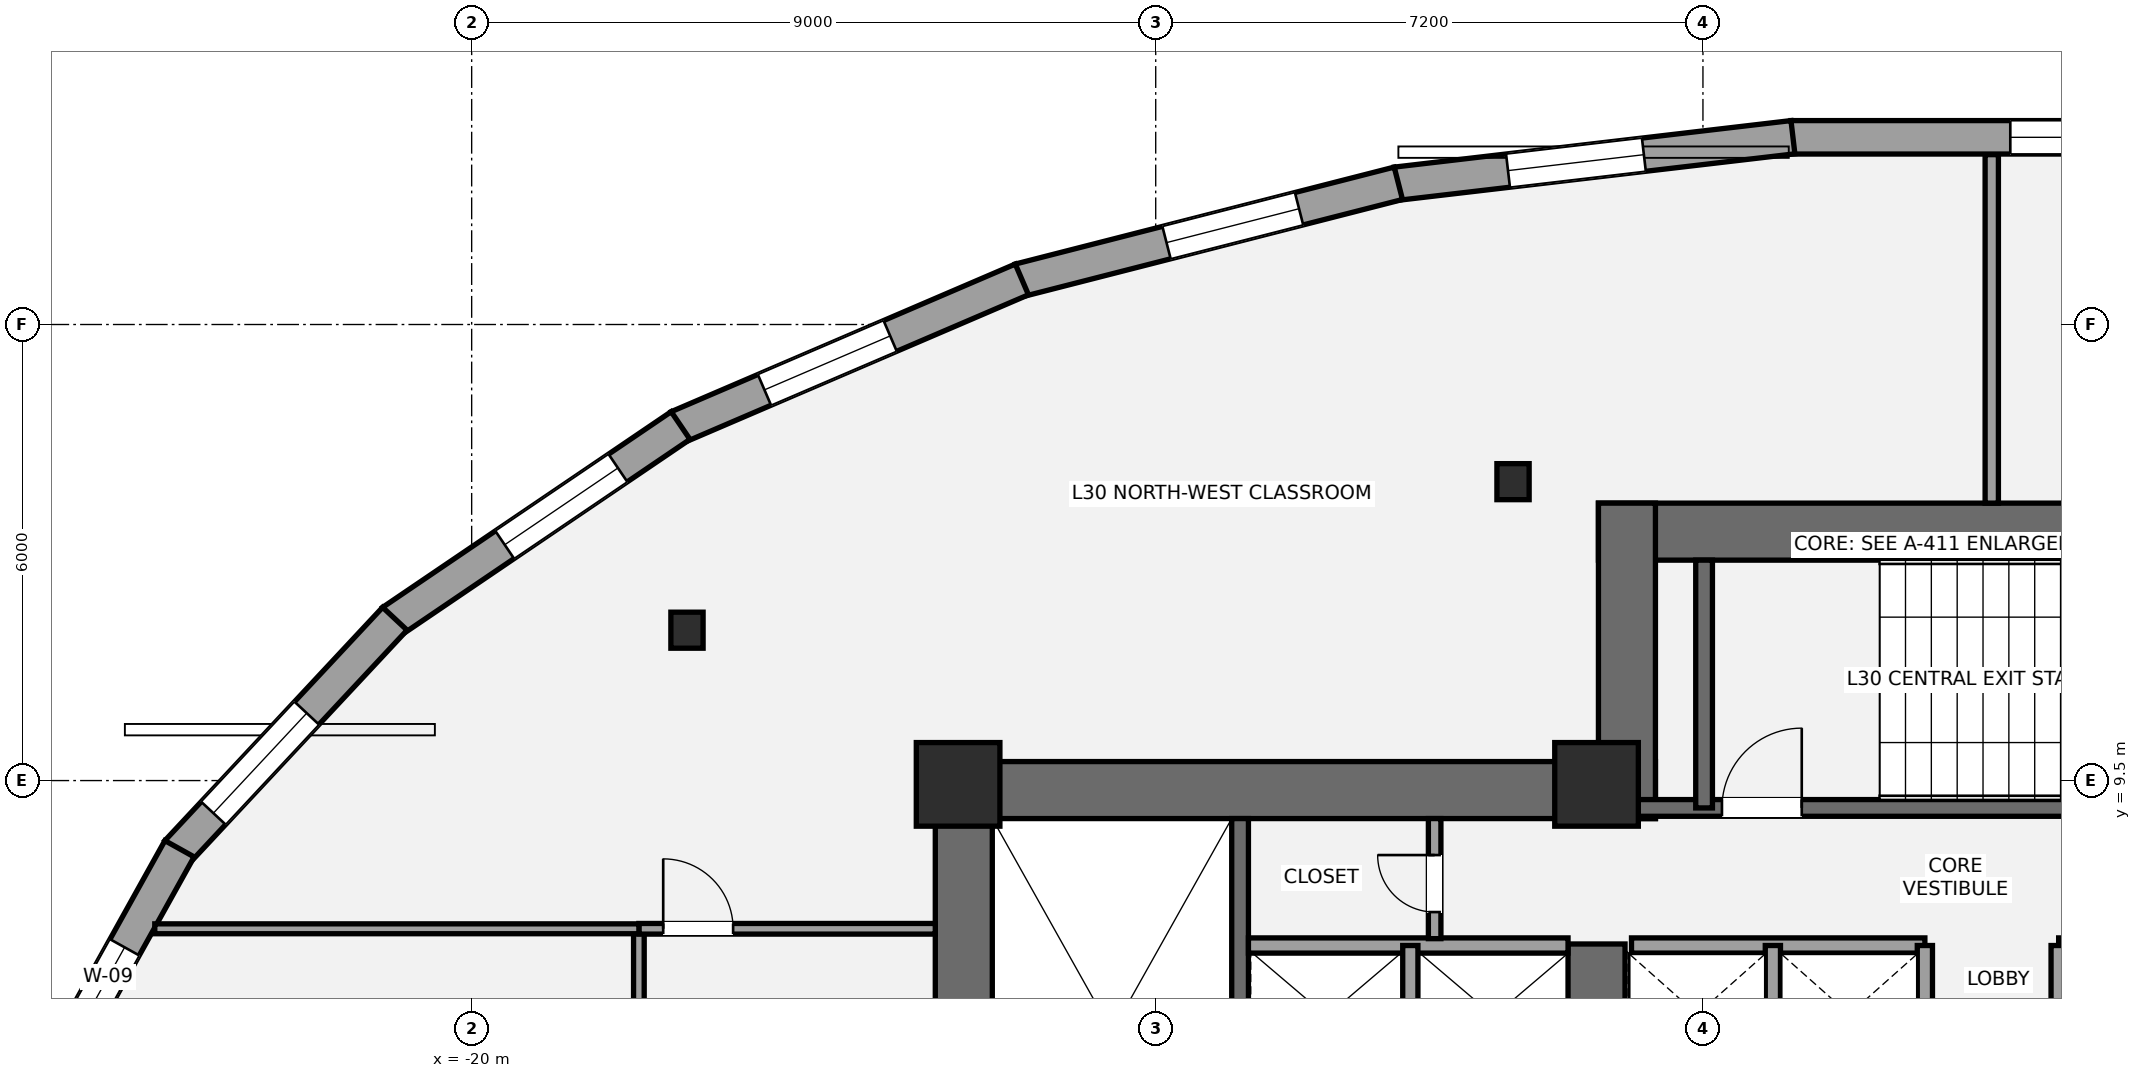
"""IFC4 building model, lengths in metres.
Left out: names, types, materials, properties, quantities, classifications, styles, units other than length and angle.
Written with IfcOpenShell. Run it as: python <this file> out.ifc"""

import sys

from ifc_helpers import new_model, si_unit, direction, frame, frame_2d, origin, origin_2d, place, context, subcontext, project, spatial, rectangle, i_section, extrude, element, fill, save


model = new_model("IFC4")
c1 = context("Model", 3, precision=1e-05, world=origin(), true_north=direction((0.0, 1.0)))
c2 = subcontext(c1, "Body", "Model", "MODEL_VIEW")
j1 = project(units=[si_unit("LENGTHUNIT", "METRE"), si_unit("PLANEANGLEUNIT", "RADIAN")], contexts=[c1])
p1 = place(None, origin())
s1 = spatial("IfcSite", under=j1, at=p1, CompositionType="ELEMENT")
p2 = place(p1, origin())
s2 = spatial("IfcBuilding", under=s1, at=p2, CompositionType="ELEMENT")
p3 = place(p2, frame((0.0, 0.0, 114.1)))
s3 = spatial("IfcBuildingStorey", under=s2, at=p3, CompositionType="ELEMENT", Elevation=114.1)
p4 = place(p3, frame((-13.525, 1.1, 0.0), z_axis=(0.0, 0.0, 1.0), x_axis=(0.0, 1.0, 0.0)))
e1 = element("IfcWall", 1, at=p4, inside=s3, PredefinedType="SHEAR", context=c2, shape_type="SweptSolid", body=[
    extrude(rectangle(XDim=8.65, YDim=0.75, at=frame_2d((4.325, 0.0))), origin(), (0.0, 0.0, 1.0), 3.5),
])
p5 = place(p3, frame((-13.9, 9.375, 0.0), z_axis=(0.0, 0.0, 1.0), x_axis=(1.0, 0.0, 0.0)))
e2 = element("IfcWall", 2, at=p5, inside=s3, PredefinedType="SHEAR", context=c2, shape_type="SweptSolid", body=[
    extrude(rectangle(XDim=9.475, YDim=0.75, at=frame_2d((4.737, 0.0))), origin(), (0.0, 0.0, 1.0), 3.5),
])
p6 = place(p3, frame((-5.2, 5.35, 0.0), z_axis=(0.0, 0.0, 1.0), x_axis=(0.0, 1.0, 0.0)))
e3 = element("IfcWall", 3, at=p6, inside=s3, PredefinedType="SHEAR", context=c2, shape_type="SweptSolid", body=[
    extrude(rectangle(XDim=2.0, YDim=0.75, at=frame_2d((1.0, 0.0))), origin(), (0.0, 0.0, 1.0), 3.5),
])
p7 = place(p3, frame((-9.89, 1.85, 0.0), z_axis=(0.0, 0.0, 1.0), x_axis=(0.0, 1.0, 0.0)))
e4 = element("IfcWall", 4, at=p7, inside=s3, PredefinedType="SHEAR", context=c2, shape_type="SweptSolid", body=[
    extrude(rectangle(XDim=7.15, YDim=0.22, at=frame_2d((3.575, 0.0))), origin(), (0.0, 0.0, 1.0), 3.5),
])
p8 = place(p3, frame((-5.175, 12.775, 0.0), z_axis=(0.0, 0.0, 1.0), x_axis=(1.0, 0.0, 0.0)))
e5 = element("IfcWall", 5, at=p8, inside=s3, PredefinedType="SHEAR", context=c2, shape_type="SweptSolid", body=[
    extrude(rectangle(XDim=10.35, YDim=0.75, at=frame_2d((5.175, 0.0))), origin(), (0.0, 0.0, 1.0), 3.5),
])
p9 = place(p3, frame((-4.8, 9.0, 0.0), z_axis=(0.0, 0.0, 1.0), x_axis=(0.0, 1.0, 0.0)))
e6 = element("IfcWall", 6, at=p9, inside=s3, PredefinedType="SHEAR", context=c2, shape_type="SweptSolid", body=[
    extrude(rectangle(XDim=4.15, YDim=0.75, at=frame_2d((2.075, 0.0))), origin(), (0.0, 0.0, 1.0), 3.5),
])
p10 = place(p3, frame((-4.7, 9.14, 0.0), z_axis=(0.0, 0.0, 1.0), x_axis=(1.0, 0.0, 0.0)))
e7 = element("IfcWall", 7, at=p10, inside=s3, PredefinedType="SHEAR", context=c2, shape_type="SweptSolid", body=[
    extrude(rectangle(XDim=9.3, YDim=0.22, at=frame_2d((4.65, 0.0))), origin(), (0.0, 0.0, 1.0), 3.5),
])
p11 = place(p10, frame((1.15, 0.0, 0.0)))
e8 = element("IfcOpeningElement", 8, at=p11, cuts=e7, PredefinedType="OPENING", context=c2, shape_type="SweptSolid", body=[
    extrude(rectangle(XDim=1.05, YDim=2.15, at=frame_2d((0.525, 1.075))), frame((0.0, 0.12, 0.0), z_axis=(0.0, -1.0, 0.0), x_axis=(1.0, 0.0, 0.0)), (0.0, 0.0, 1.0), 0.24),
])
p12 = place(p3, frame((-3.785, 9.14, 0.0), z_axis=(0.0, 0.0, 1.0), x_axis=(0.0, 1.0, 0.0)))
e9 = element("IfcWall", 9, at=p12, inside=s3, PredefinedType="SHEAR", context=c2, shape_type="SweptSolid", body=[
    extrude(rectangle(XDim=3.26, YDim=0.22, at=frame_2d((1.63, 0.0))), origin(), (0.0, 0.0, 1.0), 3.5),
])
for number, where, z_axis, x_axis in (
    (10, (-13.6, 9.45, 0.0), (0.0, 0.0, 1.0), (1.0, 0.0, 0.0)),
    (11, (-5.2, 9.45, 0.0), (0.0, 0.0, 1.0), (1.0, 0.0, 0.0)),
):
    element("IfcColumn", number, at=place(p3, frame(where, z_axis=z_axis, x_axis=x_axis)), inside=s3, PredefinedType="COLUMN", context=c2, shape_type="SweptSolid", body=[
        extrude(rectangle(XDim=1.1, YDim=1.1, at=origin_2d()), origin(), (0.0, 0.0, 1.0), 3.5),
    ])
for number, where, z_axis, x_axis in (
    (12, (-6.299, 13.433, 0.0), (0.0, 0.0, 1.0), (1.0, 0.0, 0.0)),
    (13, (-17.167, 11.478, 0.0), (0.0, 0.0, 1.0), (1.0, 0.0, 0.0)),
):
    element("IfcColumn", number, at=place(p3, frame(where, z_axis=z_axis, x_axis=x_axis)), inside=s3, PredefinedType="COLUMN", context=c2, shape_type="SweptSolid", body=[
        extrude(i_section(OverallWidth=0.424, OverallDepth=0.474, WebThickness=0.048, FlangeThickness=0.077, at=origin_2d()), origin(), (0.0, 0.0, 1.0), 3.5),
    ])
p13 = place(p3, frame((-2.642, 17.963, 0.0), z_axis=(0.0, 0.0, 1.0), x_axis=(1.0, 0.0, 0.0)))
e14 = element("IfcWall", 14, at=p13, inside=s3, PredefinedType="STANDARD", context=c2, shape_type="SweptSolid", body=[
    extrude(rectangle(XDim=5.283, YDim=0.44, at=frame_2d((2.642, 0.0))), origin(), (0.0, 0.0, 1.0), 2.528),
])
p14 = place(p13, frame((2.885, 0.0, 0.65)))
e15 = element("IfcOpeningElement", 15, at=p14, cuts=e14, PredefinedType="OPENING", context=c2, shape_type="SweptSolid", body=[
    extrude(rectangle(XDim=1.8, YDim=1.7, at=frame_2d((0.9, 0.85))), frame((0.0, 0.23, 0.0), z_axis=(0.0, -1.0, 0.0), x_axis=(1.0, 0.0, 0.0)), (0.0, 0.0, 1.0), 0.46),
])
p15 = place(p3, frame((-7.836, 17.352, 0.0), z_axis=(0.0, 0.0, 1.0), x_axis=(0.993202502633, 0.116399264444, 0.0)))
e16 = element("IfcWall", 16, at=p15, inside=s3, PredefinedType="STANDARD", context=c2, shape_type="SweptSolid", body=[
    extrude(rectangle(XDim=5.256, YDim=0.44, at=frame_2d((2.628, 0.0))), origin(), (0.0, 0.0, 1.0), 2.528),
])
p16 = place(p15, frame((1.482, 0.0, 0.65)))
e17 = element("IfcOpeningElement", 17, at=p16, cuts=e16, PredefinedType="OPENING", context=c2, shape_type="SweptSolid", body=[
    extrude(rectangle(XDim=1.8, YDim=1.7, at=frame_2d((0.9, 0.85))), frame((0.0, 0.23, 0.0), z_axis=(0.0, -1.0, 0.0), x_axis=(1.0, 0.0, 0.0)), (0.0, 0.0, 1.0), 0.46),
])
p17 = place(p3, frame((-12.793, 16.082, 0.0), z_axis=(0.0, 0.0, 1.0), x_axis=(0.968802439575, 0.247834285507, 0.0)))
e18 = element("IfcWall", 18, at=p17, inside=s3, PredefinedType="STANDARD", context=c2, shape_type="SweptSolid", body=[
    extrude(rectangle(XDim=5.146, YDim=0.44, at=frame_2d((2.573, 0.0))), origin(), (0.0, 0.0, 1.0), 2.528),
])
p18 = place(p17, frame((1.998, 0.0, 0.65)))
e19 = element("IfcOpeningElement", 19, at=p18, cuts=e18, PredefinedType="OPENING", context=c2, shape_type="SweptSolid", body=[
    extrude(rectangle(XDim=1.8, YDim=1.7, at=frame_2d((0.9, 0.85))), frame((0.0, 0.23, 0.0), z_axis=(0.0, -1.0, 0.0), x_axis=(1.0, 0.0, 0.0)), (0.0, 0.0, 1.0), 0.46),
])
p19 = place(p3, frame((-17.288, 14.151, 0.0), z_axis=(0.0, 0.0, 1.0), x_axis=(0.919001414266, 0.39425423343, 0.0)))
e20 = element("IfcWall", 20, at=p19, inside=s3, PredefinedType="STANDARD", context=c2, shape_type="SweptSolid", body=[
    extrude(rectangle(XDim=4.926, YDim=0.44, at=frame_2d((2.463, 0.0))), origin(), (0.0, 0.0, 1.0), 2.528),
])
p20 = place(p19, frame((1.241, 0.0, 0.65)))
e21 = element("IfcOpeningElement", 21, at=p20, cuts=e20, PredefinedType="OPENING", context=c2, shape_type="SweptSolid", body=[
    extrude(rectangle(XDim=1.8, YDim=1.7, at=frame_2d((0.9, 0.85))), frame((0.0, 0.23, 0.0), z_axis=(0.0, -1.0, 0.0), x_axis=(1.0, 0.0, 0.0)), (0.0, 0.0, 1.0), 0.46),
])
p21 = place(p3, frame((-21.048, 11.597, 0.0), z_axis=(0.0, 0.0, 1.0), x_axis=(0.827717717125, 0.561144705719, 0.0)))
e22 = element("IfcWall", 22, at=p21, inside=s3, PredefinedType="STANDARD", context=c2, shape_type="SweptSolid", body=[
    extrude(rectangle(XDim=4.587, YDim=0.44, at=frame_2d((2.293, 0.0))), origin(), (0.0, 0.0, 1.0), 2.528),
])
p22 = place(p21, frame((1.791, 0.0, 0.65)))
e23 = element("IfcOpeningElement", 23, at=p22, cuts=e22, PredefinedType="OPENING", context=c2, shape_type="SweptSolid", body=[
    extrude(rectangle(XDim=1.8, YDim=1.7, at=frame_2d((0.9, 0.85))), frame((0.0, 0.23, 0.0), z_axis=(0.0, -1.0, 0.0), x_axis=(1.0, 0.0, 0.0)), (0.0, 0.0, 1.0), 0.46),
])
p23 = place(p3, frame((-23.875, 8.56, 0.0), z_axis=(0.0, 0.0, 1.0), x_axis=(0.682353469166, 0.73102239577, 0.0)))
e24 = element("IfcWall", 24, at=p23, inside=s3, PredefinedType="STANDARD", context=c2, shape_type="SweptSolid", body=[
    extrude(rectangle(XDim=4.199, YDim=0.44, at=frame_2d((2.099, 0.0))), origin(), (0.0, 0.0, 1.0), 2.528),
])
p24 = place(p23, frame((0.7, 0.0, 0.65)))
e25 = element("IfcOpeningElement", 25, at=p24, cuts=e24, PredefinedType="OPENING", context=c2, shape_type="SweptSolid", body=[
    extrude(rectangle(XDim=1.8, YDim=1.7, at=frame_2d((0.9, 0.85))), frame((0.0, 0.23, 0.0), z_axis=(0.0, -1.0, 0.0), x_axis=(1.0, 0.0, 0.0)), (0.0, 0.0, 1.0), 0.46),
])
p25 = place(p3, frame((-25.725, 5.223, 0.0), z_axis=(0.0, 0.0, 1.0), x_axis=(0.486285838125, 0.873799796086, 0.0)))
e26 = element("IfcWall", 26, at=p25, inside=s3, PredefinedType="STANDARD", context=c2, shape_type="SweptSolid", body=[
    extrude(rectangle(XDim=3.868, YDim=0.44, at=frame_2d((1.934, 0.0))), origin(), (0.0, 0.0, 1.0), 2.528),
])
p26 = place(p25, frame((1.484, 0.0, 0.58)))
e27 = element("IfcOpeningElement", 27, at=p26, cuts=e26, PredefinedType="OPENING", context=c2, shape_type="SweptSolid", body=[
    extrude(rectangle(XDim=0.9, YDim=1.35, at=frame_2d((0.45, 0.675))), frame((0.0, 0.23, 0.0), z_axis=(0.0, -1.0, 0.0), x_axis=(1.0, 0.0, 0.0)), (0.0, 0.0, 1.0), 0.46),
])
p27 = place(p3, frame((-9.78, 7.33, 0.0), z_axis=(0.0, 0.0, 1.0), x_axis=(1.0, 0.0, 0.0)))
e28 = element("IfcWall", 28, at=p27, inside=s3, PredefinedType="SOLIDWALL", context=c2, shape_type="SweptSolid", body=[
    extrude(rectangle(XDim=4.205, YDim=0.2, at=frame_2d((2.103, 0.0))), origin(), (0.0, 0.0, 1.0), 3.31),
])
p28 = place(p3, frame((-7.65, 5.47, 0.0), z_axis=(0.0, 0.0, 1.0), x_axis=(0.0, 1.0, 0.0)))
e29 = element("IfcWall", 29, at=p28, inside=s3, PredefinedType="SOLIDWALL", context=c2, shape_type="SweptSolid", body=[
    extrude(rectangle(XDim=1.86, YDim=0.2, at=frame_2d((0.93, 0.0))), origin(), (0.0, 0.0, 1.0), 3.31),
])
for number, where, z_axis, x_axis in (
    (30, (-4.74, 7.33, 0.0), (0.0, 0.0, 1.0), (1.0, 0.0, 0.0)),
    (31, (0.88, 7.33, 0.0), (0.0, 0.0, 1.0), (1.0, 0.0, 0.0)),
):
    element("IfcWall", number, at=place(p3, frame(where, z_axis=z_axis, x_axis=x_axis)), inside=s3, PredefinedType="SOLIDWALL", context=c2, shape_type="SweptSolid", body=[
        extrude(rectangle(XDim=3.86, YDim=0.2, at=frame_2d((1.93, 0.0))), origin(), (0.0, 0.0, 1.0), 3.31),
    ])
for number, where, z_axis, x_axis in (
    (32, (-2.88, 5.52, 0.0), (0.0, 0.0, 1.0), (0.0, 1.0, 0.0)),
    (33, (-0.88, 5.52, 0.0), (0.0, 0.0, 1.0), (0.0, 1.0, 0.0)),
    (34, (0.88, 5.52, 0.0), (0.0, 0.0, 1.0), (0.0, 1.0, 0.0)),
):
    element("IfcWall", number, at=place(p3, frame(where, z_axis=z_axis, x_axis=x_axis)), inside=s3, PredefinedType="SOLIDWALL", context=c2, shape_type="SweptSolid", body=[
        extrude(rectangle(XDim=1.81, YDim=0.2, at=frame_2d((0.905, 0.0))), origin(), (0.0, 0.0, 1.0), 3.31),
    ])
p29 = place(p3, frame((-7.33, 7.42, 0.0), z_axis=(0.0, 0.0, 1.0), x_axis=(0.0, 1.0, 0.0)))
e35 = element("IfcWall", 35, at=p29, inside=s3, PredefinedType="PARTITIONING", context=c2, shape_type="SweptSolid", body=[
    extrude(rectangle(XDim=1.58, YDim=0.165, at=frame_2d((0.79, 0.0))), origin(), (0.0, 0.0, 1.0), 3.31),
])
p30 = place(p29, frame((0.35, 0.0, 0.0)))
e36 = element("IfcOpeningElement", 36, at=p30, cuts=e35, PredefinedType="OPENING", context=c2, shape_type="SweptSolid", body=[
    extrude(rectangle(XDim=0.75, YDim=2.1, at=frame_2d((0.375, 1.05))), frame((0.0, 0.093, 0.0), z_axis=(0.0, -1.0, 0.0), x_axis=(1.0, 0.0, 0.0)), (0.0, 0.0, 1.0), 0.185),
])
p31 = place(p3, frame((-17.8, -11.408, 0.0), z_axis=(0.0, 0.0, 1.0), x_axis=(0.0, 1.0, 0.0)))
e37 = element("IfcWall", 37, at=p31, inside=s3, PredefinedType="PARTITIONING", context=c2, shape_type="SweptSolid", body=[
    extrude(rectangle(XDim=18.958, YDim=0.14, at=frame_2d((9.479, 0.0))), origin(), (0.0, 0.0, 1.0), 2.688),
])
p32 = place(p31, frame((7.408, 0.0, 0.0)))
e38 = element("IfcOpeningElement", 38, at=p32, cuts=e37, PredefinedType="OPENING", context=c2, shape_type="SweptSolid", body=[
    extrude(rectangle(XDim=0.9, YDim=2.1, at=frame_2d((0.45, 1.05))), frame((0.0, 0.08, 0.0), z_axis=(0.0, -1.0, 0.0), x_axis=(1.0, 0.0, 0.0)), (0.0, 0.0, 1.0), 0.16),
])
p33 = place(p31, frame((11.858, 0.0, 0.0)))
e39 = element("IfcOpeningElement", 39, at=p33, cuts=e37, PredefinedType="OPENING", context=c2, shape_type="SweptSolid", body=[
    extrude(rectangle(XDim=0.9, YDim=2.1, at=frame_2d((0.45, 1.05))), frame((0.0, 0.08, 0.0), z_axis=(0.0, -1.0, 0.0), x_axis=(1.0, 0.0, 0.0)), (0.0, 0.0, 1.0), 0.16),
])
p34 = place(p31, frame((16.333, 0.0, 0.0)))
e40 = element("IfcOpeningElement", 40, at=p34, cuts=e37, PredefinedType="OPENING", context=c2, shape_type="SweptSolid", body=[
    extrude(rectangle(XDim=0.9, YDim=2.1, at=frame_2d((0.45, 1.05))), frame((0.0, 0.08, 0.0), z_axis=(0.0, -1.0, 0.0), x_axis=(1.0, 0.0, 0.0)), (0.0, 0.0, 1.0), 0.16),
])
p35 = place(p3, frame((-17.8, 7.55, 0.0), z_axis=(0.0, 0.0, 1.0), x_axis=(1.0, 0.0, 0.0)))
e41 = element("IfcWall", 41, at=p35, inside=s3, PredefinedType="PARTITIONING", context=c2, shape_type="SweptSolid", body=[
    extrude(rectangle(XDim=3.9, YDim=0.14, at=frame_2d((1.95, 0.0))), origin(), (0.0, 0.0, 1.0), 2.763),
])
p36 = place(p35, frame((0.32, 0.0, 0.0)))
e42 = element("IfcOpeningElement", 42, at=p36, cuts=e41, PredefinedType="OPENING", context=c2, shape_type="SweptSolid", body=[
    extrude(rectangle(XDim=0.92, YDim=2.15, at=frame_2d((0.46, 1.075))), frame((0.0, 0.08, 0.0), z_axis=(0.0, -1.0, 0.0), x_axis=(1.0, 0.0, 0.0)), (0.0, 0.0, 1.0), 0.16),
])
p37 = place(p3, frame((0.0, 13.15, 0.0), z_axis=(0.0, 0.0, 1.0), x_axis=(0.0, 1.0, 0.0)))
e43 = element("IfcWall", 43, at=p37, inside=s3, PredefinedType="PARTITIONING", context=c2, shape_type="SweptSolid", body=[
    extrude(rectangle(XDim=4.585, YDim=0.175, at=frame_2d((2.292, 0.0))), origin(), (0.0, 0.0, 1.0), 3.31),
])
p38 = place(p3, frame((-24.169, 7.55, 0.0), z_axis=(0.0, 0.0, 1.0), x_axis=(1.0, 0.0, 0.0)))
e44 = element("IfcWall", 44, at=p38, inside=s3, PredefinedType="PARTITIONING", context=c2, shape_type="SweptSolid", body=[
    extrude(rectangle(XDim=6.369, YDim=0.13, at=frame_2d((3.185, 0.0))), origin(), (0.0, 0.0, 1.0), 3.31),
])
p39 = place(p14, origin())
e45 = element("IfcWindow", 45, at=p39, inside=s3, PartitioningType="SINGLE_PANEL", PredefinedType="WINDOW", context=c2, shape_type="SweptSolid", body=[
    extrude(rectangle(XDim=1.8, YDim=1.7, at=frame_2d((0.9, 0.85))), frame((0.0, -0.01, 0.0), z_axis=(0.0, -1.0, 0.0), x_axis=(1.0, 0.0, 0.0)), (0.0, 0.0, 1.0), 0.06),
])
fill(e15, e45)
p40 = place(p16, origin())
e46 = element("IfcWindow", 46, at=p40, inside=s3, PartitioningType="SINGLE_PANEL", PredefinedType="WINDOW", context=c2, shape_type="SweptSolid", body=[
    extrude(rectangle(XDim=1.8, YDim=1.7, at=frame_2d((0.9, 0.85))), frame((0.0, -0.01, 0.0), z_axis=(0.0, -1.0, 0.0), x_axis=(1.0, 0.0, 0.0)), (0.0, 0.0, 1.0), 0.06),
])
fill(e17, e46)
p41 = place(p18, origin())
e47 = element("IfcWindow", 47, at=p41, inside=s3, PartitioningType="SINGLE_PANEL", PredefinedType="WINDOW", context=c2, shape_type="SweptSolid", body=[
    extrude(rectangle(XDim=1.8, YDim=1.7, at=frame_2d((0.9, 0.85))), frame((0.0, -0.01, 0.0), z_axis=(0.0, -1.0, 0.0), x_axis=(1.0, 0.0, 0.0)), (0.0, 0.0, 1.0), 0.06),
])
fill(e19, e47)
p42 = place(p20, origin())
e48 = element("IfcWindow", 48, at=p42, inside=s3, PartitioningType="SINGLE_PANEL", PredefinedType="WINDOW", context=c2, shape_type="SweptSolid", body=[
    extrude(rectangle(XDim=1.8, YDim=1.7, at=frame_2d((0.9, 0.85))), frame((0.0, -0.01, 0.0), z_axis=(0.0, -1.0, 0.0), x_axis=(1.0, 0.0, 0.0)), (0.0, 0.0, 1.0), 0.06),
])
fill(e21, e48)
p43 = place(p22, origin())
e49 = element("IfcWindow", 49, at=p43, inside=s3, PartitioningType="SINGLE_PANEL", PredefinedType="WINDOW", context=c2, shape_type="SweptSolid", body=[
    extrude(rectangle(XDim=1.8, YDim=1.7, at=frame_2d((0.9, 0.85))), frame((0.0, -0.01, 0.0), z_axis=(0.0, -1.0, 0.0), x_axis=(1.0, 0.0, 0.0)), (0.0, 0.0, 1.0), 0.06),
])
fill(e23, e49)
p44 = place(p24, origin())
e50 = element("IfcWindow", 50, at=p44, inside=s3, PartitioningType="SINGLE_PANEL", PredefinedType="WINDOW", context=c2, shape_type="SweptSolid", body=[
    extrude(rectangle(XDim=1.8, YDim=1.7, at=frame_2d((0.9, 0.85))), frame((0.0, -0.01, 0.0), z_axis=(0.0, -1.0, 0.0), x_axis=(1.0, 0.0, 0.0)), (0.0, 0.0, 1.0), 0.06),
])
fill(e25, e50)
p45 = place(p26, origin())
e51 = element("IfcWindow", 51, at=p45, inside=s3, PartitioningType="SINGLE_PANEL", PredefinedType="WINDOW", context=c2, shape_type="SweptSolid", body=[
    extrude(rectangle(XDim=0.9, YDim=1.35, at=frame_2d((0.45, 0.675))), frame((0.0, -0.01, 0.0), z_axis=(0.0, -1.0, 0.0), x_axis=(1.0, 0.0, 0.0)), (0.0, 0.0, 1.0), 0.06),
])
fill(e27, e51)
p46 = place(p11, origin())
e52 = element("IfcDoor", 52, at=p46, inside=s3, OperationType="SINGLE_SWING_RIGHT", PredefinedType="DOOR", context=c2, shape_type="SweptSolid", body=[
    extrude(rectangle(XDim=1.05, YDim=2.15, at=frame_2d((0.525, 1.075))), frame((0.0, 0.025, 0.0), z_axis=(0.0, -1.0, 0.0), x_axis=(1.0, 0.0, 0.0)), (0.0, 0.0, 1.0), 0.05),
])
fill(e8, e52)
p47 = place(p30, origin())
e53 = element("IfcDoor", 53, at=p47, inside=s3, OperationType="SINGLE_SWING_RIGHT", PredefinedType="DOOR", context=c2, shape_type="SweptSolid", body=[
    extrude(rectangle(XDim=0.75, YDim=2.1, at=frame_2d((0.375, 1.05))), frame((0.0, 0.025, 0.0), z_axis=(0.0, -1.0, 0.0), x_axis=(1.0, 0.0, 0.0)), (0.0, 0.0, 1.0), 0.05),
])
fill(e36, e53)
p48 = place(p36, origin())
e54 = element("IfcDoor", 54, at=p48, inside=s3, OperationType="SINGLE_SWING_LEFT", PredefinedType="DOOR", context=c2, shape_type="SweptSolid", body=[
    extrude(rectangle(XDim=0.92, YDim=2.15, at=frame_2d((0.46, 1.075))), frame((0.0, 0.025, 0.0), z_axis=(0.0, -1.0, 0.0), x_axis=(1.0, 0.0, 0.0)), (0.0, 0.0, 1.0), 0.05),
])
fill(e42, e54)
save(model, sys.argv[1])
